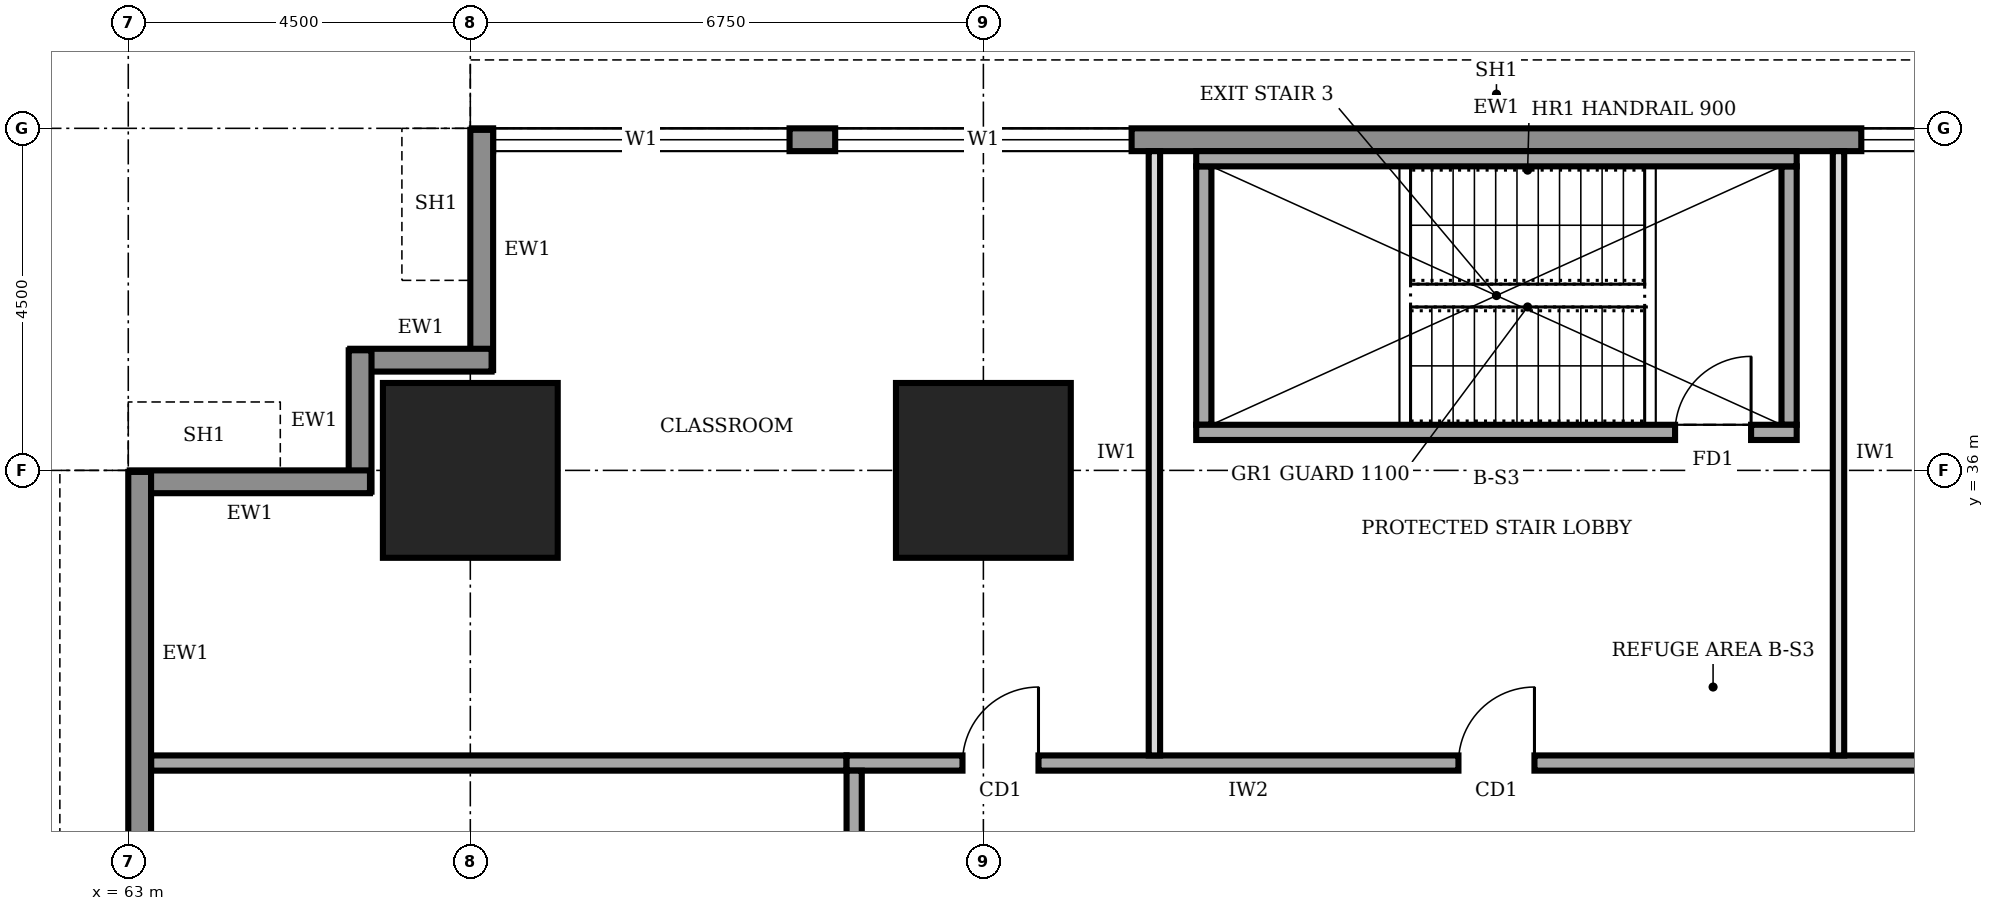
"""IFC4 building model, lengths in metres.
Left out: names, types, materials, properties, quantities, classifications, styles, units other than length and angle.
Written with IfcOpenShell. Run it as: python <this file> out.ifc"""

import sys

from ifc_helpers import new_model, si_unit, direction, frame, frame_2d, origin, origin_2d, place, context, subcontext, project, spatial, rectangle, extrude, element, fill, save


model = new_model("IFC4")
c1 = context("Model", 3, precision=1e-05, world=origin(), true_north=direction((0.0, 1.0)))
c2 = subcontext(c1, "Body", "Model", "MODEL_VIEW")
j1 = project(units=[si_unit("LENGTHUNIT", "METRE"), si_unit("PLANEANGLEUNIT", "RADIAN")], contexts=[c1])
p1 = place(None, origin())
s1 = spatial("IfcSite", under=j1, at=p1, CompositionType="ELEMENT")
p2 = place(p1, origin())
s2 = spatial("IfcBuilding", under=s1, at=p2, CompositionType="ELEMENT")
p3 = place(p2, frame((0.0, 0.0, 45.0)))
s3 = spatial("IfcBuildingStorey", under=s2, at=p3, CompositionType="ELEMENT", Elevation=45.0)
for number, where, z_axis, x_axis in (
    (1, (67.5, 36.0, 0.0), (0.0, 0.0, 1.0), (1.0, 0.0, 0.0)),
    (2, (74.25, 36.0, 0.0), (0.0, 0.0, 1.0), (1.0, 0.0, 0.0)),
):
    element("IfcColumn", number, at=place(p3, frame(where, z_axis=z_axis, x_axis=x_axis)), inside=s3, PredefinedType="COLUMN", context=c2, shape_type="SweptSolid", body=[
        extrude(rectangle(XDim=2.3, YDim=2.3, at=origin_2d()), origin(), (0.0, 0.0, 1.0), 4.0),
    ])
p4 = place(p3, frame((94.48, 40.35, 0.0), z_axis=(0.0, 0.0, 1.0), x_axis=(-1.0, 0.0, 0.0)))
e3 = element("IfcWall", 3, at=p4, inside=s3, PredefinedType="STANDARD", context=c2, shape_type="SweptSolid", body=[
    extrude(rectangle(XDim=26.96, YDim=0.3, at=frame_2d((13.48, 0.0))), origin(), (0.0, 0.0, 1.0), 3.75),
])
p5 = place(p4, frame((22.78, 0.0, 0.9)))
e4 = element("IfcOpeningElement", 4, at=p5, cuts=e3, PredefinedType="OPENING", context=c2, shape_type="SweptSolid", body=[
    extrude(rectangle(XDim=3.9, YDim=2.2, at=frame_2d((1.95, 1.1))), frame((0.0, 0.16, 0.0), z_axis=(0.0, -1.0, 0.0), x_axis=(1.0, 0.0, 0.0)), (0.0, 0.0, 1.0), 0.32),
])
p6 = place(p4, frame((18.28, 0.0, 0.9)))
e5 = element("IfcOpeningElement", 5, at=p6, cuts=e3, PredefinedType="OPENING", context=c2, shape_type="SweptSolid", body=[
    extrude(rectangle(XDim=3.9, YDim=2.2, at=frame_2d((1.95, 1.1))), frame((0.0, 0.16, 0.0), z_axis=(0.0, -1.0, 0.0), x_axis=(1.0, 0.0, 0.0)), (0.0, 0.0, 1.0), 0.32),
])
p7 = place(p4, frame((4.78, 0.0, 0.9)))
e6 = element("IfcOpeningElement", 6, at=p7, cuts=e3, PredefinedType="OPENING", context=c2, shape_type="SweptSolid", body=[
    extrude(rectangle(XDim=3.9, YDim=2.2, at=frame_2d((1.95, 1.1))), frame((0.0, 0.16, 0.0), z_axis=(0.0, -1.0, 0.0), x_axis=(1.0, 0.0, 0.0)), (0.0, 0.0, 1.0), 0.32),
])
p8 = place(p3, frame((67.65, 40.48, 0.0), z_axis=(0.0, 0.0, 1.0), x_axis=(0.0, -1.0, 0.0)))
e7 = element("IfcWall", 7, at=p8, inside=s3, PredefinedType="STANDARD", context=c2, shape_type="SweptSolid", body=[
    extrude(rectangle(XDim=3.16, YDim=0.3, at=frame_2d((1.58, 0.0))), origin(), (0.0, 0.0, 1.0), 2.85),
])
for number, where, z_axis, x_axis in (
    (8, (67.78, 37.45, 0.0), (0.0, 0.0, 1.0), (-1.0, 0.0, 0.0)),
    (9, (66.05, 37.58, 0.0), (0.0, 0.0, 1.0), (0.0, -1.0, 0.0)),
):
    element("IfcWall", number, at=place(p3, frame(where, z_axis=z_axis, x_axis=x_axis)), inside=s3, PredefinedType="STANDARD", context=c2, shape_type="SweptSolid", body=[
        extrude(rectangle(XDim=1.86, YDim=0.3, at=frame_2d((0.93, 0.0))), origin(), (0.0, 0.0, 1.0), 3.75),
    ])
p9 = place(p3, frame((66.18, 35.85, 0.0), z_axis=(0.0, 0.0, 1.0), x_axis=(-1.0, 0.0, 0.0)))
e10 = element("IfcWall", 10, at=p9, inside=s3, PredefinedType="STANDARD", context=c2, shape_type="SweptSolid", body=[
    extrude(rectangle(XDim=3.16, YDim=0.3, at=frame_2d((1.58, 0.0))), origin(), (0.0, 0.0, 1.0), 2.85),
])
p10 = place(p3, frame((63.15, 35.98, 0.0), z_axis=(0.0, 0.0, 1.0), x_axis=(0.0, -1.0, 0.0)))
e11 = element("IfcWall", 11, at=p10, inside=s3, PredefinedType="STANDARD", context=c2, shape_type="SweptSolid", body=[
    extrude(rectangle(XDim=31.46, YDim=0.3, at=frame_2d((15.73, 0.0))), origin(), (0.0, 0.0, 1.0), 3.75),
])
p11 = place(p10, frame((27.28, 0.0, 0.9)))
e12 = element("IfcOpeningElement", 12, at=p11, cuts=e11, PredefinedType="OPENING", context=c2, shape_type="SweptSolid", body=[
    extrude(rectangle(XDim=3.9, YDim=2.2, at=frame_2d((1.95, 1.1))), frame((0.0, 0.16, 0.0), z_axis=(0.0, -1.0, 0.0), x_axis=(1.0, 0.0, 0.0)), (0.0, 0.0, 1.0), 0.32),
])
p12 = place(p10, frame((22.78, 0.0, 0.9)))
e13 = element("IfcOpeningElement", 13, at=p12, cuts=e11, PredefinedType="OPENING", context=c2, shape_type="SweptSolid", body=[
    extrude(rectangle(XDim=3.9, YDim=2.2, at=frame_2d((1.95, 1.1))), frame((0.0, 0.16, 0.0), z_axis=(0.0, -1.0, 0.0), x_axis=(1.0, 0.0, 0.0)), (0.0, 0.0, 1.0), 0.32),
])
p13 = place(p10, frame((18.28, 0.0, 0.9)))
e14 = element("IfcOpeningElement", 14, at=p13, cuts=e11, PredefinedType="OPENING", context=c2, shape_type="SweptSolid", body=[
    extrude(rectangle(XDim=3.9, YDim=2.2, at=frame_2d((1.95, 1.1))), frame((0.0, 0.16, 0.0), z_axis=(0.0, -1.0, 0.0), x_axis=(1.0, 0.0, 0.0)), (0.0, 0.0, 1.0), 0.32),
])
p14 = place(p10, frame((13.78, 0.0, 0.9)))
e15 = element("IfcOpeningElement", 15, at=p14, cuts=e11, PredefinedType="OPENING", context=c2, shape_type="SweptSolid", body=[
    extrude(rectangle(XDim=3.9, YDim=2.2, at=frame_2d((1.95, 1.1))), frame((0.0, 0.16, 0.0), z_axis=(0.0, -1.0, 0.0), x_axis=(1.0, 0.0, 0.0)), (0.0, 0.0, 1.0), 0.32),
])
p15 = place(p10, frame((9.28, 0.0, 0.9)))
e16 = element("IfcOpeningElement", 16, at=p15, cuts=e11, PredefinedType="OPENING", context=c2, shape_type="SweptSolid", body=[
    extrude(rectangle(XDim=3.9, YDim=2.2, at=frame_2d((1.95, 1.1))), frame((0.0, 0.16, 0.0), z_axis=(0.0, -1.0, 0.0), x_axis=(1.0, 0.0, 0.0)), (0.0, 0.0, 1.0), 0.32),
])
p16 = place(p10, frame((4.78, 0.0, 0.9)))
e17 = element("IfcOpeningElement", 17, at=p16, cuts=e11, PredefinedType="OPENING", context=c2, shape_type="SweptSolid", body=[
    extrude(rectangle(XDim=3.9, YDim=2.2, at=frame_2d((1.95, 1.1))), frame((0.0, 0.16, 0.0), z_axis=(0.0, -1.0, 0.0), x_axis=(1.0, 0.0, 0.0)), (0.0, 0.0, 1.0), 0.32),
])
p17 = place(p3, frame((89.35, 32.15, 0.0), z_axis=(0.0, 0.0, 1.0), x_axis=(-1.0, 0.0, 0.0)))
e18 = element("IfcWall", 18, at=p17, inside=s3, PredefinedType="SOLIDWALL", context=c2, shape_type="SweptSolid", body=[
    extrude(rectangle(XDim=16.9, YDim=0.2, at=frame_2d((8.45, 0.0))), origin(), (0.0, 0.0, 1.0), 3.75),
])
p18 = place(p17, frame((14.375, 0.0, 0.0)))
e19 = element("IfcOpeningElement", 19, at=p18, cuts=e18, PredefinedType="OPENING", context=c2, shape_type="SweptSolid", body=[
    extrude(rectangle(XDim=1.0, YDim=2.1, at=frame_2d((0.5, 1.05))), frame((0.0, 0.11, 0.0), z_axis=(0.0, -1.0, 0.0), x_axis=(1.0, 0.0, 0.0)), (0.0, 0.0, 1.0), 0.22),
])
p19 = place(p17, frame((7.85, 0.0, 0.0)))
e20 = element("IfcOpeningElement", 20, at=p19, cuts=e18, PredefinedType="OPENING", context=c2, shape_type="SweptSolid", body=[
    extrude(rectangle(XDim=1.0, YDim=2.1, at=frame_2d((0.5, 1.05))), frame((0.0, 0.11, 0.0), z_axis=(0.0, -1.0, 0.0), x_axis=(1.0, 0.0, 0.0)), (0.0, 0.0, 1.0), 0.22),
])
p20 = place(p17, frame((1.325, 0.0, 0.0)))
e21 = element("IfcOpeningElement", 21, at=p20, cuts=e18, PredefinedType="OPENING", context=c2, shape_type="SweptSolid", body=[
    extrude(rectangle(XDim=1.0, YDim=2.1, at=frame_2d((0.5, 1.05))), frame((0.0, 0.11, 0.0), z_axis=(0.0, -1.0, 0.0), x_axis=(1.0, 0.0, 0.0)), (0.0, 0.0, 1.0), 0.22),
])
p21 = place(p3, frame((72.55, 32.05, 0.0), z_axis=(0.0, 0.0, 1.0), x_axis=(0.0, -1.0, 0.0)))
e22 = element("IfcWall", 22, at=p21, inside=s3, PredefinedType="SOLIDWALL", context=c2, shape_type="SweptSolid", body=[
    extrude(rectangle(XDim=23.8, YDim=0.2, at=frame_2d((11.9, 0.0))), origin(), (0.0, 0.0, 1.0), 3.75),
])
p22 = place(p21, frame((18.425, 0.0, 0.0)))
e23 = element("IfcOpeningElement", 23, at=p22, cuts=e22, PredefinedType="OPENING", context=c2, shape_type="SweptSolid", body=[
    extrude(rectangle(XDim=1.0, YDim=2.1, at=frame_2d((0.5, 1.05))), frame((0.0, 0.11, 0.0), z_axis=(0.0, -1.0, 0.0), x_axis=(1.0, 0.0, 0.0)), (0.0, 0.0, 1.0), 0.22),
])
p23 = place(p21, frame((6.225, 0.0, 0.0)))
e24 = element("IfcOpeningElement", 24, at=p23, cuts=e22, PredefinedType="OPENING", context=c2, shape_type="SweptSolid", body=[
    extrude(rectangle(XDim=1.4, YDim=2.1, at=frame_2d((0.7, 1.05))), frame((0.0, 0.11, 0.0), z_axis=(0.0, -1.0, 0.0), x_axis=(1.0, 0.0, 0.0)), (0.0, 0.0, 1.0), 0.22),
])
p24 = place(p3, frame((63.3, 32.15, 0.0), z_axis=(0.0, 0.0, 1.0), x_axis=(1.0, 0.0, 0.0)))
e25 = element("IfcWall", 25, at=p24, inside=s3, PredefinedType="SOLIDWALL", context=c2, shape_type="SweptSolid", body=[
    extrude(rectangle(XDim=9.15, YDim=0.2, at=frame_2d((4.575, 0.0))), origin(), (0.0, 0.0, 1.0), 3.75),
])
for number, where, z_axis, x_axis in (
    (26, (76.5, 32.25, 0.0), (0.0, 0.0, 1.0), (0.0, 1.0, 0.0)),
    (27, (85.5, 32.25, 0.0), (0.0, 0.0, 1.0), (0.0, 1.0, 0.0)),
):
    element("IfcWall", number, at=place(p3, frame(where, z_axis=z_axis, x_axis=x_axis)), inside=s3, PredefinedType="PARTITIONING", context=c2, shape_type="SweptSolid", body=[
        extrude(rectangle(XDim=7.95, YDim=0.15, at=frame_2d((3.975, 0.0))), origin(), (0.0, 0.0, 1.0), 3.75),
    ])
p25 = place(p3, frame((77.05, 36.5, 0.0), z_axis=(0.0, 0.0, 1.0), x_axis=(1.0, 0.0, 0.0)))
e28 = element("IfcWall", 28, at=p25, inside=s3, PredefinedType="SOLIDWALL", context=c2, shape_type="SweptSolid", body=[
    extrude(rectangle(XDim=7.9, YDim=0.2, at=frame_2d((3.95, 0.0))), origin(), (0.0, 0.0, 1.0), 3.75),
])
p26 = place(p25, frame((6.3, 0.0, 0.0)))
e29 = element("IfcOpeningElement", 29, at=p26, cuts=e28, PredefinedType="OPENING", context=c2, shape_type="SweptSolid", body=[
    extrude(rectangle(XDim=1.0, YDim=2.1, at=frame_2d((0.5, 1.05))), frame((0.0, 0.11, 0.0), z_axis=(0.0, -1.0, 0.0), x_axis=(1.0, 0.0, 0.0)), (0.0, 0.0, 1.0), 0.22),
])
p27 = place(p3, frame((77.05, 40.1, 0.0), z_axis=(0.0, 0.0, 1.0), x_axis=(1.0, 0.0, 0.0)))
e30 = element("IfcWall", 30, at=p27, inside=s3, PredefinedType="SOLIDWALL", context=c2, shape_type="SweptSolid", body=[
    extrude(rectangle(XDim=7.9, YDim=0.2, at=frame_2d((3.95, 0.0))), origin(), (0.0, 0.0, 1.0), 3.75),
])
for number, where, z_axis, x_axis in (
    (31, (77.15, 36.6, 0.0), (0.0, 0.0, 1.0), (0.0, 1.0, 0.0)),
    (32, (84.85, 36.6, 0.0), (0.0, 0.0, 1.0), (0.0, 1.0, 0.0)),
):
    element("IfcWall", number, at=place(p3, frame(where, z_axis=z_axis, x_axis=x_axis)), inside=s3, PredefinedType="SOLIDWALL", context=c2, shape_type="SweptSolid", body=[
        extrude(rectangle(XDim=3.4, YDim=0.2, at=frame_2d((1.7, 0.0))), origin(), (0.0, 0.0, 1.0), 3.75),
    ])
p28 = place(p5, origin())
e33 = element("IfcWindow", 33, at=p28, inside=s3, PartitioningType="SINGLE_PANEL", PredefinedType="WINDOW", context=c2, shape_type="SweptSolid", body=[
    extrude(rectangle(XDim=3.9, YDim=2.2, at=frame_2d((1.95, 1.1))), frame((0.0, 0.03, 0.0), z_axis=(0.0, -1.0, 0.0), x_axis=(1.0, 0.0, 0.0)), (0.0, 0.0, 1.0), 0.06),
])
fill(e4, e33)
p29 = place(p6, origin())
e34 = element("IfcWindow", 34, at=p29, inside=s3, PartitioningType="SINGLE_PANEL", PredefinedType="WINDOW", context=c2, shape_type="SweptSolid", body=[
    extrude(rectangle(XDim=3.9, YDim=2.2, at=frame_2d((1.95, 1.1))), frame((0.0, 0.03, 0.0), z_axis=(0.0, -1.0, 0.0), x_axis=(1.0, 0.0, 0.0)), (0.0, 0.0, 1.0), 0.06),
])
fill(e5, e34)
p30 = place(p7, origin())
e35 = element("IfcWindow", 35, at=p30, inside=s3, PartitioningType="SINGLE_PANEL", PredefinedType="WINDOW", context=c2, shape_type="SweptSolid", body=[
    extrude(rectangle(XDim=3.9, YDim=2.2, at=frame_2d((1.95, 1.1))), frame((0.0, 0.03, 0.0), z_axis=(0.0, -1.0, 0.0), x_axis=(1.0, 0.0, 0.0)), (0.0, 0.0, 1.0), 0.06),
])
fill(e6, e35)
p31 = place(p18, frame((1.0, 0.0, 0.0), z_axis=(0.0, 0.0, 1.0), x_axis=(-1.0, 0.0, 0.0)))
e36 = element("IfcDoor", 36, at=p31, inside=s3, OperationType="SINGLE_SWING_RIGHT", PredefinedType="DOOR", context=c2, shape_type="SweptSolid", body=[
    extrude(rectangle(XDim=1.0, YDim=2.1, at=frame_2d((0.5, 1.05))), frame((0.0, 0.025, 0.0), z_axis=(0.0, -1.0, 0.0), x_axis=(1.0, 0.0, 0.0)), (0.0, 0.0, 1.0), 0.05),
])
fill(e19, e36)
p32 = place(p19, frame((1.0, 0.0, 0.0), z_axis=(0.0, 0.0, 1.0), x_axis=(-1.0, 0.0, 0.0)))
e37 = element("IfcDoor", 37, at=p32, inside=s3, OperationType="SINGLE_SWING_RIGHT", PredefinedType="DOOR", context=c2, shape_type="SweptSolid", body=[
    extrude(rectangle(XDim=1.0, YDim=2.1, at=frame_2d((0.5, 1.05))), frame((0.0, 0.025, 0.0), z_axis=(0.0, -1.0, 0.0), x_axis=(1.0, 0.0, 0.0)), (0.0, 0.0, 1.0), 0.05),
])
fill(e20, e37)
p33 = place(p26, origin())
e38 = element("IfcDoor", 38, at=p33, inside=s3, OperationType="SINGLE_SWING_RIGHT", PredefinedType="DOOR", context=c2, shape_type="SweptSolid", body=[
    extrude(rectangle(XDim=1.0, YDim=2.1, at=frame_2d((0.5, 1.05))), frame((0.0, 0.025, 0.0), z_axis=(0.0, -1.0, 0.0), x_axis=(1.0, 0.0, 0.0)), (0.0, 0.0, 1.0), 0.05),
])
fill(e29, e38)
save(model, sys.argv[1])
